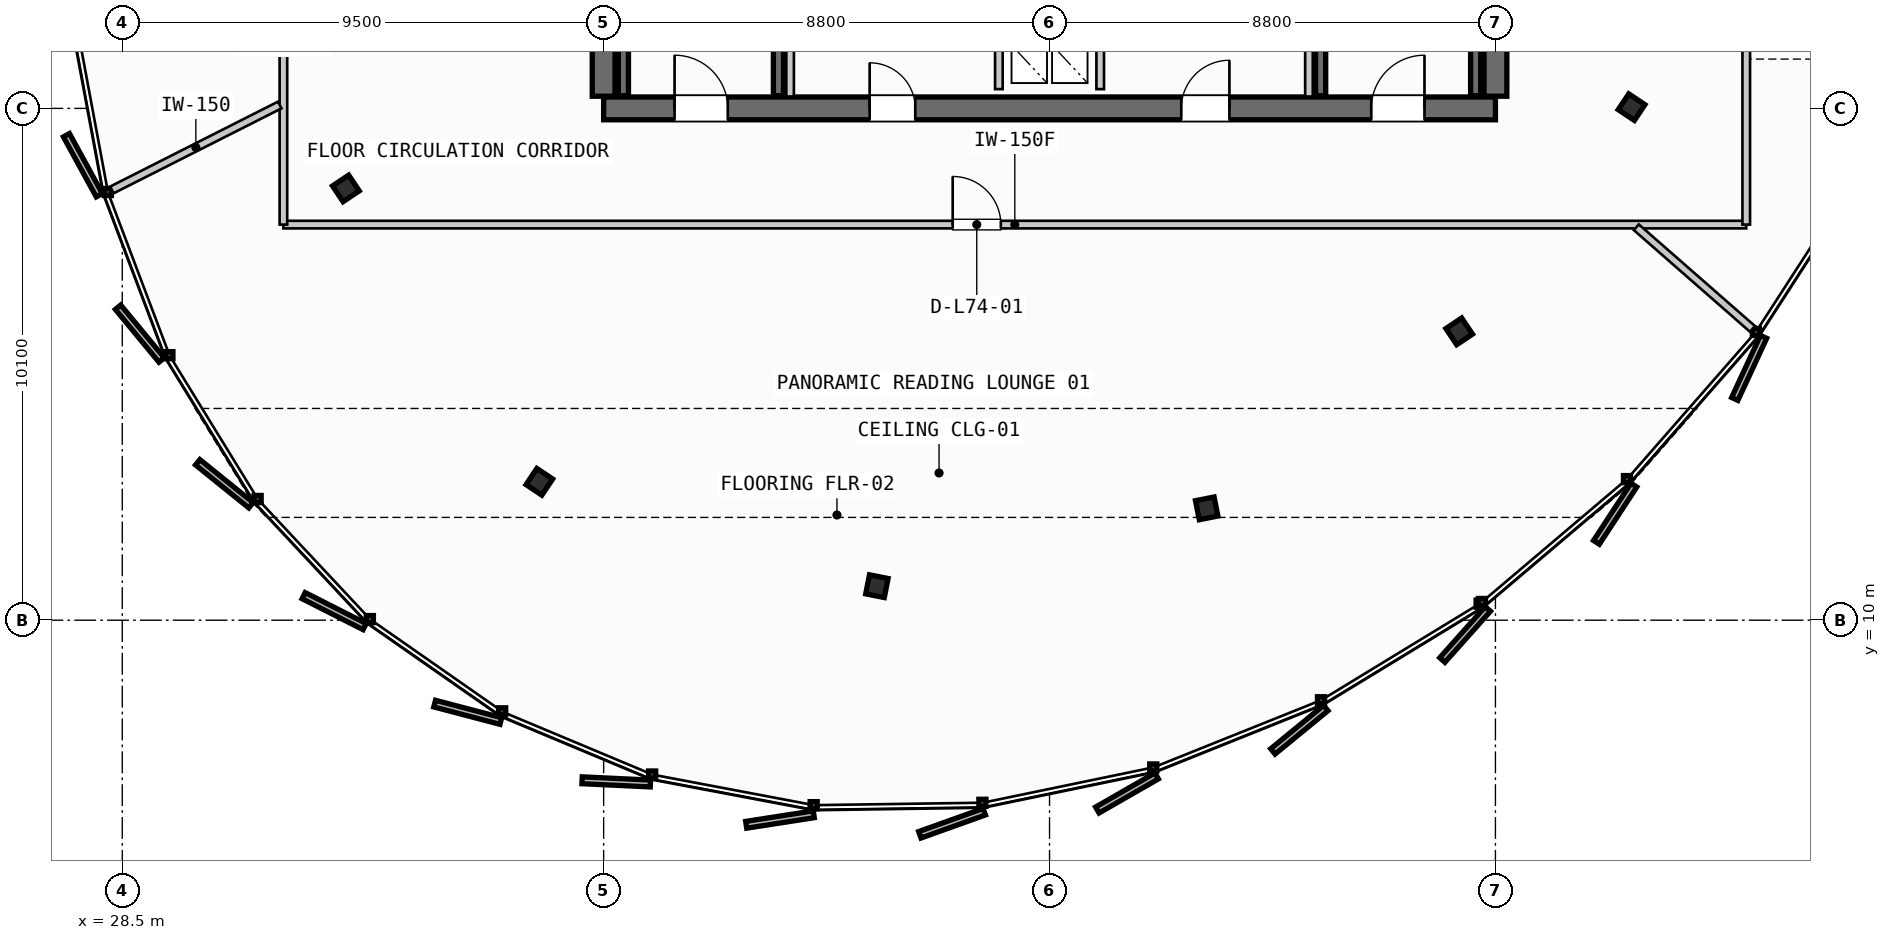
"""IFC4 building model, lengths in metres.
Left out: names, types, materials, properties, quantities, classifications, styles, units other than length and angle.
Written with IfcOpenShell. Run it as: python <this file> out.ifc"""

import sys

from ifc_helpers import new_model, si_unit, direction, frame, frame_2d, origin, origin_2d, place, context, subcontext, project, spatial, rectangle, i_section, extrude, source, transform, mapped, element, fill, save


model = new_model("IFC4")
c1 = context("Model", 3, precision=1e-05, world=origin(), true_north=direction((0.0, 1.0)))
c2 = subcontext(c1, "Body", "Model", "MODEL_VIEW")
j1 = project(units=[si_unit("LENGTHUNIT", "METRE"), si_unit("PLANEANGLEUNIT", "RADIAN")], contexts=[c1])
p1 = place(None, origin())
s1 = spatial("IfcSite", under=j1, at=p1, CompositionType="ELEMENT")
p2 = place(p1, origin())
s2 = spatial("IfcBuilding", under=s1, at=p2, CompositionType="ELEMENT")
p3 = place(p2, frame((0.0, 0.0, 280.15)))
s3 = spatial("IfcBuildingStorey", under=s2, at=p3, CompositionType="ELEMENT", Elevation=280.15)
p4 = place(p3, frame((38.0, 20.1, 0.0), z_axis=(0.0, 0.0, 1.0), x_axis=(1.0, 0.0, 0.0)))
e1 = element("IfcWall", 1, at=p4, inside=s3, PredefinedType="SHEAR", context=c2, shape_type="SweptSolid", body=[
    extrude(rectangle(XDim=17.6, YDim=0.45, at=frame_2d((8.8, 0.0))), origin(), (0.0, 0.0, 1.0), 3.21),
])
p5 = place(p4, frame((1.4, 0.0, 0.0)))
e2 = element("IfcOpeningElement", 2, at=p5, cuts=e1, PredefinedType="OPENING", context=c2, shape_type="SweptSolid", body=[
    extrude(rectangle(XDim=1.05, YDim=2.15, at=frame_2d((0.525, 1.075))), frame((0.0, 0.235, 0.0), z_axis=(0.0, -1.0, 0.0), x_axis=(1.0, 0.0, 0.0)), (0.0, 0.0, 1.0), 0.47),
])
p6 = place(p4, frame((15.15, 0.0, 0.0)))
e3 = element("IfcOpeningElement", 3, at=p6, cuts=e1, PredefinedType="OPENING", context=c2, shape_type="SweptSolid", body=[
    extrude(rectangle(XDim=1.05, YDim=2.15, at=frame_2d((0.525, 1.075))), frame((0.0, 0.235, 0.0), z_axis=(0.0, -1.0, 0.0), x_axis=(1.0, 0.0, 0.0)), (0.0, 0.0, 1.0), 0.47),
])
p7 = place(p4, frame((5.25, 0.0, 0.0)))
e4 = element("IfcOpeningElement", 4, at=p7, cuts=e1, PredefinedType="OPENING", context=c2, shape_type="SweptSolid", body=[
    extrude(rectangle(XDim=0.9, YDim=2.15, at=frame_2d((0.45, 1.075))), frame((0.0, 0.235, 0.0), z_axis=(0.0, -1.0, 0.0), x_axis=(1.0, 0.0, 0.0)), (0.0, 0.0, 1.0), 0.47),
])
p8 = place(p4, frame((11.4, 0.0, 0.0)))
e5 = element("IfcOpeningElement", 5, at=p8, cuts=e1, PredefinedType="OPENING", context=c2, shape_type="SweptSolid", body=[
    extrude(rectangle(XDim=0.95, YDim=2.15, at=frame_2d((0.475, 1.075))), frame((0.0, 0.235, 0.0), z_axis=(0.0, -1.0, 0.0), x_axis=(1.0, 0.0, 0.0)), (0.0, 0.0, 1.0), 0.47),
])
p9 = place(p3, frame((38.0, 35.26, 0.0), z_axis=(0.0, 0.0, 1.0), x_axis=(0.0, -1.0, 0.0)))
e6 = element("IfcWall", 6, at=p9, inside=s3, PredefinedType="SHEAR", context=c2, shape_type="SweptSolid", body=[
    extrude(rectangle(XDim=14.92, YDim=0.45, at=frame_2d((7.46, 0.0))), origin(), (0.0, 0.0, 1.0), 3.21),
])
p10 = place(p9, frame((5.21, 0.0, 0.0)))
e7 = element("IfcOpeningElement", 7, at=p10, cuts=e6, PredefinedType="OPENING", context=c2, shape_type="SweptSolid", body=[
    extrude(rectangle(XDim=1.1, YDim=2.2, at=frame_2d((0.55, 1.1))), frame((0.0, 0.235, 0.0), z_axis=(0.0, -1.0, 0.0), x_axis=(1.0, 0.0, 0.0)), (0.0, 0.0, 1.0), 0.47),
])
p11 = place(p3, frame((55.6, 20.34, 0.0), z_axis=(0.0, 0.0, 1.0), x_axis=(0.0, 1.0, 0.0)))
e8 = element("IfcWall", 8, at=p11, inside=s3, PredefinedType="SHEAR", context=c2, shape_type="SweptSolid", body=[
    extrude(rectangle(XDim=14.92, YDim=0.45, at=frame_2d((7.46, 0.0))), origin(), (0.0, 0.0, 1.0), 3.21),
])
p12 = place(p11, frame((12.71, 0.0, 0.0)))
e9 = element("IfcOpeningElement", 9, at=p12, cuts=e8, PredefinedType="OPENING", context=c2, shape_type="SweptSolid", body=[
    extrude(rectangle(XDim=1.05, YDim=2.15, at=frame_2d((0.525, 1.075))), frame((0.0, 0.235, 0.0), z_axis=(0.0, -1.0, 0.0), x_axis=(1.0, 0.0, 0.0)), (0.0, 0.0, 1.0), 0.47),
])
p13 = place(p11, frame((8.61, 0.0, 0.0)))
e10 = element("IfcOpeningElement", 10, at=p13, cuts=e8, PredefinedType="OPENING", context=c2, shape_type="SweptSolid", body=[
    extrude(rectangle(XDim=1.1, YDim=2.2, at=frame_2d((0.55, 1.1))), frame((0.0, 0.235, 0.0), z_axis=(0.0, -1.0, 0.0), x_axis=(1.0, 0.0, 0.0)), (0.0, 0.0, 1.0), 0.47),
])
m1 = source(origin(), c2, "Body", "SweptSolid", [
    extrude(i_section(OverallWidth=0.374, OverallDepth=0.383, WebThickness=0.017, FlangeThickness=0.026, FilletRadius=0.015, at=origin_2d()), origin(), (0.0, 0.0, 1.0), 3.21),
])
for number, where, z_axis, x_axis in (
    (11, (32.913, 18.521, 0.0), (0.0, 0.0, 1.0), (-0.831, -0.556, 0.0)),
    (12, (36.731, 12.731, 0.0), (0.0, 0.0, 1.0), (-0.556, -0.831, 0.0)),
    (13, (43.393, 10.671, 0.0), (0.0, 0.0, 1.0), (-0.195, -0.981, 0.0)),
    (14, (49.902, 12.207, 0.0), (0.0, 0.0, 1.0), (0.195, -0.981, 0.0)),
    (15, (54.885, 15.7, 0.0), (0.0, 0.0, 1.0), (0.556, -0.831, 0.0)),
    (16, (58.287, 20.125, 0.0), (0.0, 0.0, 1.0), (0.831, -0.556, 0.0)),
):
    element("IfcColumn", number, at=place(p3, frame(where, z_axis=z_axis, x_axis=x_axis)), inside=s3, PredefinedType="COLUMN", context=c2, shape_type="MappedRepresentation", body=[
        mapped(m1, transform((0.0, 0.0, 0.0), scale=1.0)),
    ])
for number, where, z_axis, x_axis in (
    (17, (41.45, 27.7, 0.0), (0.0, 0.0, 1.0), (0.0, -1.0, 0.0)),
    (18, (38.39, 20.35, 0.0), (0.0, 0.0, 1.0), (0.0, 1.0, 0.0)),
    (19, (55.21, 27.7, 0.0), (0.0, 0.0, 1.0), (0.0, -1.0, 0.0)),
    (20, (52.15, 20.35, 0.0), (0.0, 0.0, 1.0), (0.0, 1.0, 0.0)),
):
    element("IfcWall", number, at=place(p3, frame(where, z_axis=z_axis, x_axis=x_axis)), inside=s3, PredefinedType="SHEAR", context=c2, shape_type="SweptSolid", body=[
        extrude(rectangle(XDim=7.35, YDim=0.2, at=frame_2d((3.675, 0.0))), origin(), (0.0, 0.0, 1.0), 3.21),
    ])
for number, where, z_axis, x_axis in (
    (21, (45.8, 20.48, 0.0), (0.0, 0.0, 1.0), (0.0, 1.0, 0.0)),
    (22, (47.8, 20.48, 0.0), (0.0, 0.0, 1.0), (0.0, 1.0, 0.0)),
):
    element("IfcWall", number, at=place(p3, frame(where, z_axis=z_axis, x_axis=x_axis)), inside=s3, PredefinedType="PARTITIONING", context=c2, shape_type="SweptSolid", body=[
        extrude(rectangle(XDim=2.24, YDim=0.15, at=frame_2d((1.12, 0.0))), origin(), (0.0, 0.0, 1.0), 2.455),
    ])
for number, where, z_axis, x_axis in (
    (23, (41.68, 20.335, 0.0), (0.0, 0.0, 1.0), (0.0, 1.0, 0.0)),
    (24, (51.92, 20.335, 0.0), (0.0, 0.0, 1.0), (0.0, 1.0, 0.0)),
):
    element("IfcWall", number, at=place(p3, frame(where, z_axis=z_axis, x_axis=x_axis)), inside=s3, PredefinedType="PARTITIONING", context=c2, shape_type="SweptSolid", body=[
        extrude(rectangle(XDim=2.395, YDim=0.15, at=frame_2d((1.198, 0.0))), origin(), (0.0, 0.0, 1.0), 2.455),
    ])
p14 = place(p3, frame((31.68, 17.807, 0.0), z_axis=(0.0, 0.0, 1.0), x_axis=(1.0, 0.0, 0.0)))
e25 = element("IfcWall", 25, at=p14, inside=s3, PredefinedType="PARTITIONING", context=c2, shape_type="SweptSolid", body=[
    extrude(rectangle(XDim=28.87, YDim=0.15, at=frame_2d((14.435, 0.0))), origin(), (0.0, 0.0, 1.0), 2.455),
])
p15 = place(p14, frame((13.209, 0.0, 0.0)))
e26 = element("IfcOpeningElement", 26, at=p15, cuts=e25, PredefinedType="OPENING", context=c2, shape_type="SweptSolid", body=[
    extrude(rectangle(XDim=0.95, YDim=2.15, at=frame_2d((0.475, 1.075))), frame((0.0, 0.085, 0.0), z_axis=(0.0, -1.0, 0.0), x_axis=(1.0, 0.0, 0.0)), (0.0, 0.0, 1.0), 0.17),
])
p16 = place(p3, frame((60.55, 17.807, 0.0), z_axis=(0.0, 0.0, 1.0), x_axis=(0.0, 1.0, 0.0)))
e27 = element("IfcWall", 27, at=p16, inside=s3, PredefinedType="PARTITIONING", context=c2, shape_type="SweptSolid", body=[
    extrude(rectangle(XDim=19.986, YDim=0.15, at=frame_2d((9.993, 0.0))), origin(), (0.0, 0.0, 1.0), 2.455),
])
p17 = place(p16, frame((4.263, 0.0, 0.0)))
e28 = element("IfcOpeningElement", 28, at=p17, cuts=e27, PredefinedType="OPENING", context=c2, shape_type="SweptSolid", body=[
    extrude(rectangle(XDim=0.95, YDim=2.15, at=frame_2d((0.475, 1.075))), frame((0.0, 0.085, 0.0), z_axis=(0.0, -1.0, 0.0), x_axis=(1.0, 0.0, 0.0)), (0.0, 0.0, 1.0), 0.17),
])
p18 = place(p16, frame((14.076, 0.0, 0.0)))
e29 = element("IfcOpeningElement", 29, at=p18, cuts=e27, PredefinedType="OPENING", context=c2, shape_type="SweptSolid", body=[
    extrude(rectangle(XDim=0.95, YDim=2.15, at=frame_2d((0.475, 1.075))), frame((0.0, 0.085, 0.0), z_axis=(0.0, -1.0, 0.0), x_axis=(1.0, 0.0, 0.0)), (0.0, 0.0, 1.0), 0.17),
])
p19 = place(p3, frame((31.68, 37.793, 0.0), z_axis=(0.0, 0.0, 1.0), x_axis=(0.0, -1.0, 0.0)))
e30 = element("IfcWall", 30, at=p19, inside=s3, PredefinedType="PARTITIONING", context=c2, shape_type="SweptSolid", body=[
    extrude(rectangle(XDim=19.986, YDim=0.15, at=frame_2d((9.993, 0.0))), origin(), (0.0, 0.0, 1.0), 2.455),
])
p20 = place(p19, frame((4.699, 0.0, 0.0)))
e31 = element("IfcOpeningElement", 31, at=p20, cuts=e30, PredefinedType="OPENING", context=c2, shape_type="SweptSolid", body=[
    extrude(rectangle(XDim=0.95, YDim=2.15, at=frame_2d((0.475, 1.075))), frame((0.0, 0.085, 0.0), z_axis=(0.0, -1.0, 0.0), x_axis=(1.0, 0.0, 0.0)), (0.0, 0.0, 1.0), 0.17),
])
p21 = place(p19, frame((14.29, 0.0, 0.0)))
e32 = element("IfcOpeningElement", 32, at=p21, cuts=e30, PredefinedType="OPENING", context=c2, shape_type="SweptSolid", body=[
    extrude(rectangle(XDim=0.95, YDim=2.15, at=frame_2d((0.475, 1.075))), frame((0.0, 0.085, 0.0), z_axis=(0.0, -1.0, 0.0), x_axis=(1.0, 0.0, 0.0)), (0.0, 0.0, 1.0), 0.17),
])
p22 = place(p3, frame((31.609, 20.167, 0.0), z_axis=(0.0, 0.0, 1.0), x_axis=(-0.89233988313, -0.451364080289, 0.0)))
e33 = element("IfcWall", 33, at=p22, inside=s3, PredefinedType="PARTITIONING", context=c2, shape_type="SweptSolid", body=[
    extrude(rectangle(XDim=3.713, YDim=0.15, at=frame_2d((1.856, 0.0))), origin(), (0.0, 0.0, 1.0), 2.455),
])
p23 = place(p3, frame((58.381, 17.754, 0.0), z_axis=(0.0, 0.0, 1.0), x_axis=(0.752546906109, -0.658538650426, 0.0)))
e34 = element("IfcWall", 34, at=p23, inside=s3, PredefinedType="PARTITIONING", context=c2, shape_type="SweptSolid", body=[
    extrude(rectangle(XDim=3.046, YDim=0.15, at=frame_2d((1.523, 0.0))), origin(), (0.0, 0.0, 1.0), 2.455),
])
m2 = source(origin(), c2, "Body", "SweptSolid", [
    extrude(rectangle(XDim=1.05, YDim=2.15, at=frame_2d((0.525, 1.075))), frame((0.0, 0.025, 0.0), z_axis=(0.0, -1.0, 0.0), x_axis=(1.0, 0.0, 0.0)), (0.0, 0.0, 1.0), 0.05),
])
p24 = place(p5, origin())
e35 = element("IfcDoor", 35, at=p24, inside=s3, OperationType="SINGLE_SWING_LEFT", PredefinedType="DOOR", context=c2, shape_type="MappedRepresentation", body=[
    mapped(m2, transform((0.0, 0.0, 0.0), scale=1.0)),
])
fill(e2, e35)
p25 = place(p6, origin())
e36 = element("IfcDoor", 36, at=p25, inside=s3, OperationType="SINGLE_SWING_RIGHT", PredefinedType="DOOR", context=c2, shape_type="MappedRepresentation", body=[
    mapped(m2, transform((0.0, 0.0, 0.0), scale=1.0)),
])
fill(e3, e36)
m3 = source(origin(), c2, "Body", "SweptSolid", [
    extrude(rectangle(XDim=0.9, YDim=2.15, at=frame_2d((0.45, 1.075))), frame((0.0, 0.025, 0.0), z_axis=(0.0, -1.0, 0.0), x_axis=(1.0, 0.0, 0.0)), (0.0, 0.0, 1.0), 0.05),
])
p26 = place(p7, origin())
e37 = element("IfcDoor", 37, at=p26, inside=s3, OperationType="SINGLE_SWING_LEFT", PredefinedType="DOOR", context=c2, shape_type="MappedRepresentation", body=[
    mapped(m3, transform((0.0, 0.0, 0.0), scale=1.0)),
])
fill(e4, e37)
m4 = source(origin(), c2, "Body", "SweptSolid", [
    extrude(rectangle(XDim=0.95, YDim=2.15, at=frame_2d((0.475, 1.075))), frame((0.0, 0.025, 0.0), z_axis=(0.0, -1.0, 0.0), x_axis=(1.0, 0.0, 0.0)), (0.0, 0.0, 1.0), 0.05),
])
p27 = place(p8, origin())
e38 = element("IfcDoor", 38, at=p27, inside=s3, OperationType="SINGLE_SWING_RIGHT", PredefinedType="DOOR", context=c2, shape_type="MappedRepresentation", body=[
    mapped(m4, transform((0.0, 0.0, 0.0), scale=1.0)),
])
fill(e5, e38)
p28 = place(p15, origin())
e39 = element("IfcDoor", 39, at=p28, inside=s3, OperationType="SINGLE_SWING_LEFT", PredefinedType="DOOR", context=c2, shape_type="MappedRepresentation", body=[
    mapped(m4, transform((0.0, 0.0, 0.0), scale=1.0)),
])
fill(e26, e39)
save(model, sys.argv[1])
